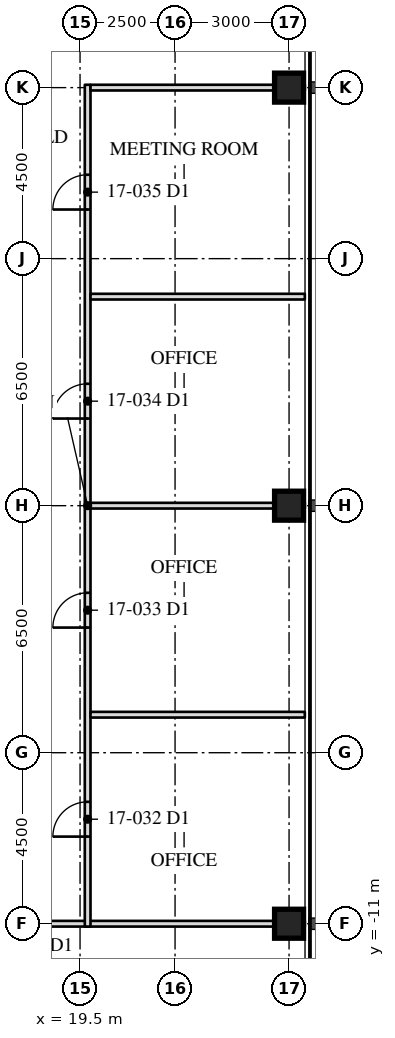
"""IFC4 building model, lengths in metres.
Left out: names, types, materials, properties, quantities, classifications, styles, units other than length and angle.
Written with IfcOpenShell. Run it as: python <this file> out.ifc"""

import sys

from ifc_helpers import new_model, si_unit, direction, frame, frame_2d, origin, origin_2d, place, context, subcontext, project, spatial, rectangle, hollow_rectangle, extrude, element, fill, save


model = new_model("IFC4")
c1 = context("Model", 3, precision=1e-05, world=origin(), true_north=direction((0.0, 1.0)))
c2 = subcontext(c1, "Body", "Model", "MODEL_VIEW")
j1 = project(units=[si_unit("LENGTHUNIT", "METRE"), si_unit("PLANEANGLEUNIT", "RADIAN")], contexts=[c1])
p1 = place(None, origin())
s1 = spatial("IfcSite", under=j1, at=p1, CompositionType="ELEMENT")
p2 = place(p1, origin())
s2 = spatial("IfcBuilding", under=s1, at=p2, CompositionType="ELEMENT")
p3 = place(p2, frame((0.0, 0.0, 73.4)))
s3 = spatial("IfcBuildingStorey", under=s2, at=p3, CompositionType="ELEMENT", Elevation=73.4)
for number, where, z_axis, x_axis in (
    (1, (25.0, -11.0, 0.0), (0.0, 0.0, 1.0), (0.0, 1.0, 0.0)),
    (2, (25.0, 0.0, 0.0), (0.0, 0.0, 1.0), (0.0, 1.0, 0.0)),
    (3, (25.0, 11.0, 0.0), (0.0, 0.0, 1.0), (0.0, 1.0, 0.0)),
):
    element("IfcColumn", number, at=place(p3, frame(where, z_axis=z_axis, x_axis=x_axis)), inside=s3, PredefinedType="COLUMN", context=c2, shape_type="SweptSolid", body=[
        extrude(hollow_rectangle(XDim=0.762, YDim=0.762, WallThickness=0.127, at=origin_2d()), origin(), (0.0, 0.0, 1.0), 4.1),
    ])
p4 = place(p3, frame((11.75, -11.0, 0.0), z_axis=(0.0, 0.0, 1.0), x_axis=(1.0, 0.0, 0.0)))
e4 = element("IfcWall", 4, at=p4, inside=s3, PredefinedType="PARTITIONING", context=c2, shape_type="SweptSolid", body=[
    extrude(rectangle(XDim=13.665, YDim=0.15, at=frame_2d((6.833, 0.0))), origin(), (0.0, 0.0, 1.0), 3.13),
])
p5 = place(p4, frame((6.018, 0.0, 0.0)))
e5 = element("IfcOpeningElement", 5, at=p5, cuts=e4, PredefinedType="OPENING", context=c2, shape_type="SweptSolid", body=[
    extrude(rectangle(XDim=0.915, YDim=2.134, at=frame_2d((0.458, 1.067))), frame((0.0, 0.085, 0.0), z_axis=(0.0, -1.0, 0.0), x_axis=(1.0, 0.0, 0.0)), (0.0, 0.0, 1.0), 0.17),
])
p6 = place(p3, frame((19.7, -11.075, 0.0), z_axis=(0.0, 0.0, 1.0), x_axis=(0.0, 1.0, 0.0)))
e6 = element("IfcWall", 6, at=p6, inside=s3, PredefinedType="PARTITIONING", context=c2, shape_type="SweptSolid", body=[
    extrude(rectangle(XDim=22.15, YDim=0.15, at=frame_2d((11.075, 0.0))), origin(), (0.0, 0.0, 1.0), 3.91),
])
p7 = place(p6, frame((2.367, 0.0, 0.0)))
e7 = element("IfcOpeningElement", 7, at=p7, cuts=e6, PredefinedType="OPENING", context=c2, shape_type="SweptSolid", body=[
    extrude(rectangle(XDim=0.915, YDim=2.134, at=frame_2d((0.458, 1.067))), frame((0.0, 0.085, 0.0), z_axis=(0.0, -1.0, 0.0), x_axis=(1.0, 0.0, 0.0)), (0.0, 0.0, 1.0), 0.17),
])
p8 = place(p6, frame((7.867, 0.0, 0.0)))
e8 = element("IfcOpeningElement", 8, at=p8, cuts=e6, PredefinedType="OPENING", context=c2, shape_type="SweptSolid", body=[
    extrude(rectangle(XDim=0.915, YDim=2.134, at=frame_2d((0.458, 1.067))), frame((0.0, 0.085, 0.0), z_axis=(0.0, -1.0, 0.0), x_axis=(1.0, 0.0, 0.0)), (0.0, 0.0, 1.0), 0.17),
])
p9 = place(p6, frame((13.367, 0.0, 0.0)))
e9 = element("IfcOpeningElement", 9, at=p9, cuts=e6, PredefinedType="OPENING", context=c2, shape_type="SweptSolid", body=[
    extrude(rectangle(XDim=0.915, YDim=2.134, at=frame_2d((0.458, 1.067))), frame((0.0, 0.085, 0.0), z_axis=(0.0, -1.0, 0.0), x_axis=(1.0, 0.0, 0.0)), (0.0, 0.0, 1.0), 0.17),
])
p10 = place(p6, frame((18.867, 0.0, 0.0)))
e10 = element("IfcOpeningElement", 10, at=p10, cuts=e6, PredefinedType="OPENING", context=c2, shape_type="SweptSolid", body=[
    extrude(rectangle(XDim=0.915, YDim=2.134, at=frame_2d((0.458, 1.067))), frame((0.0, 0.085, 0.0), z_axis=(0.0, -1.0, 0.0), x_axis=(1.0, 0.0, 0.0)), (0.0, 0.0, 1.0), 0.17),
])
p11 = place(p3, frame((19.775, -5.5, 0.0), z_axis=(0.0, 0.0, 1.0), x_axis=(1.0, 0.0, 0.0)))
e11 = element("IfcWall", 11, at=p11, inside=s3, PredefinedType="PARTITIONING", context=c2, shape_type="SweptSolid", body=[
    extrude(rectangle(XDim=5.64, YDim=0.15, at=frame_2d((2.82, 0.0))), origin(), (0.0, 0.0, 1.0), 3.91),
])
p12 = place(p3, frame((19.775, 0.0, 0.0), z_axis=(0.0, 0.0, 1.0), x_axis=(1.0, 0.0, 0.0)))
e12 = element("IfcWall", 12, at=p12, inside=s3, PredefinedType="PARTITIONING", context=c2, shape_type="SweptSolid", body=[
    extrude(rectangle(XDim=5.64, YDim=0.15, at=frame_2d((2.82, 0.0))), origin(), (0.0, 0.0, 1.0), 3.13),
])
p13 = place(p3, frame((19.775, 5.5, 0.0), z_axis=(0.0, 0.0, 1.0), x_axis=(1.0, 0.0, 0.0)))
e13 = element("IfcWall", 13, at=p13, inside=s3, PredefinedType="PARTITIONING", context=c2, shape_type="SweptSolid", body=[
    extrude(rectangle(XDim=5.64, YDim=0.15, at=frame_2d((2.82, 0.0))), origin(), (0.0, 0.0, 1.0), 3.91),
])
p14 = place(p3, frame((19.775, 11.0, 0.0), z_axis=(0.0, 0.0, 1.0), x_axis=(1.0, 0.0, 0.0)))
e14 = element("IfcWall", 14, at=p14, inside=s3, PredefinedType="PARTITIONING", context=c2, shape_type="SweptSolid", body=[
    extrude(rectangle(XDim=5.64, YDim=0.15, at=frame_2d((2.82, 0.0))), origin(), (0.0, 0.0, 1.0), 3.13),
])
p15 = place(p7, origin())
e15 = element("IfcDoor", 15, at=p15, inside=s3, OperationType="SINGLE_SWING_LEFT", PredefinedType="DOOR", context=c2, shape_type="SweptSolid", body=[
    extrude(rectangle(XDim=0.915, YDim=2.134, at=frame_2d((0.458, 1.067))), frame((0.0, 0.025, 0.0), z_axis=(0.0, -1.0, 0.0), x_axis=(1.0, 0.0, 0.0)), (0.0, 0.0, 1.0), 0.05),
])
fill(e7, e15)
p16 = place(p8, origin())
e16 = element("IfcDoor", 16, at=p16, inside=s3, OperationType="SINGLE_SWING_LEFT", PredefinedType="DOOR", context=c2, shape_type="SweptSolid", body=[
    extrude(rectangle(XDim=0.915, YDim=2.134, at=frame_2d((0.458, 1.067))), frame((0.0, 0.025, 0.0), z_axis=(0.0, -1.0, 0.0), x_axis=(1.0, 0.0, 0.0)), (0.0, 0.0, 1.0), 0.05),
])
fill(e8, e16)
p17 = place(p9, origin())
e17 = element("IfcDoor", 17, at=p17, inside=s3, OperationType="SINGLE_SWING_LEFT", PredefinedType="DOOR", context=c2, shape_type="SweptSolid", body=[
    extrude(rectangle(XDim=0.915, YDim=2.134, at=frame_2d((0.458, 1.067))), frame((0.0, 0.025, 0.0), z_axis=(0.0, -1.0, 0.0), x_axis=(1.0, 0.0, 0.0)), (0.0, 0.0, 1.0), 0.05),
])
fill(e9, e17)
p18 = place(p10, origin())
e18 = element("IfcDoor", 18, at=p18, inside=s3, OperationType="SINGLE_SWING_LEFT", PredefinedType="DOOR", context=c2, shape_type="SweptSolid", body=[
    extrude(rectangle(XDim=0.915, YDim=2.134, at=frame_2d((0.458, 1.067))), frame((0.0, 0.025, 0.0), z_axis=(0.0, -1.0, 0.0), x_axis=(1.0, 0.0, 0.0)), (0.0, 0.0, 1.0), 0.05),
])
fill(e10, e18)
save(model, sys.argv[1])
